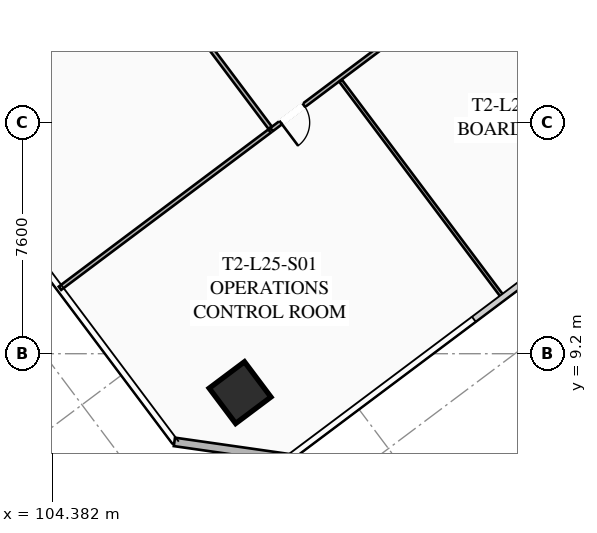
"""IFC4 building model, lengths in metres.
Left out: names, types, materials, properties, quantities, classifications, styles, units other than length and angle.
Written with IfcOpenShell. Run it as: python <this file> out.ifc"""

import sys

from ifc_helpers import new_model, si_unit, direction, frame, frame_2d, origin, origin_2d, place, context, subcontext, project, spatial, rectangle, hollow_rectangle, extrude, element, fill, save


model = new_model("IFC4")
c1 = context("Model", 3, precision=1e-05, world=origin(), true_north=direction((0.0, 1.0)))
c2 = subcontext(c1, "Body", "Model", "MODEL_VIEW")
j1 = project(units=[si_unit("LENGTHUNIT", "METRE"), si_unit("PLANEANGLEUNIT", "RADIAN")], contexts=[c1])
p1 = place(None, origin())
s1 = spatial("IfcSite", under=j1, at=p1, CompositionType="ELEMENT")
p2 = place(p1, origin())
s2 = spatial("IfcBuilding", under=s1, at=p2, CompositionType="ELEMENT")
p3 = place(p2, frame((0.0, 0.0, 95.6)))
s3 = spatial("IfcBuildingStorey", under=s2, at=p3, CompositionType="ELEMENT", Elevation=95.6)
p4 = place(p3, frame((110.56, 7.92, 0.0), z_axis=(0.0, 0.0, 1.0), x_axis=(0.799999996291, 0.600000004945, 0.0)))
e1 = element("IfcColumn", 1, at=p4, inside=s3, PredefinedType="COLUMN", context=c2, shape_type="SweptSolid", body=[
    extrude(hollow_rectangle(XDim=1.45, YDim=1.45, WallThickness=0.055, at=origin_2d()), origin(), (0.0, 0.0, 1.0), 3.35),
])
p5 = place(p3, frame((112.18, 5.76, 0.0), z_axis=(0.0, 0.0, 1.0), x_axis=(-0.989948214866, 0.141430307517, 0.0)))
e2 = element("IfcWall", 2, at=p5, inside=s3, PredefinedType="SOLIDWALL", context=c2, shape_type="SweptSolid", body=[
    extrude(rectangle(XDim=3.818, YDim=0.28, at=frame_2d((1.909, 0.0))), origin(), (0.0, 0.0, 1.0), 3.35),
])
p6 = place(p3, frame((134.18, 33.51, 0.0), z_axis=(0.0, 0.0, 1.0), x_axis=(-0.8, -0.6, 0.0)))
e3 = element("IfcWall", 3, at=p6, inside=s3, PredefinedType="PARTITIONING", context=c2, shape_type="SweptSolid", body=[
    extrude(rectangle(XDim=28.23, YDim=0.135, at=frame_2d((14.115, 0.0))), origin(), (0.0, 0.0, 1.0), 2.703),
])
p7 = place(p6, frame((26.9, 0.0, 0.0)))
e4 = element("IfcOpeningElement", 4, at=p7, cuts=e3, PredefinedType="OPENING", context=c2, shape_type="SweptSolid", body=[
    extrude(rectangle(XDim=0.95, YDim=2.05, at=frame_2d((0.475, 1.025))), frame((0.0, 0.077, 0.0), z_axis=(0.0, -1.0, 0.0), x_axis=(1.0, 0.0, 0.0)), (0.0, 0.0, 1.0), 0.155),
])
p8 = place(p6, frame((20.314, 0.0, 0.0)))
e5 = element("IfcOpeningElement", 5, at=p8, cuts=e3, PredefinedType="OPENING", context=c2, shape_type="SweptSolid", body=[
    extrude(rectangle(XDim=0.95, YDim=2.05, at=frame_2d((0.475, 1.025))), frame((0.0, 0.077, 0.0), z_axis=(0.0, -1.0, 0.0), x_axis=(1.0, 0.0, 0.0)), (0.0, 0.0, 1.0), 0.155),
])
p9 = place(p6, frame((0.38, 0.0, 0.0)))
e6 = element("IfcOpeningElement", 6, at=p9, cuts=e3, PredefinedType="OPENING", context=c2, shape_type="SweptSolid", body=[
    extrude(rectangle(XDim=0.95, YDim=2.05, at=frame_2d((0.475, 1.025))), frame((0.0, 0.077, 0.0), z_axis=(0.0, -1.0, 0.0), x_axis=(1.0, 0.0, 0.0)), (0.0, 0.0, 1.0), 0.155),
])
p10 = place(p3, frame((119.208, 11.056, 0.0), z_axis=(0.0, 0.0, 1.0), x_axis=(-0.6, 0.8, 0.0)))
e7 = element("IfcWall", 7, at=p10, inside=s3, PredefinedType="PARTITIONING", context=c2, shape_type="SweptSolid", body=[
    extrude(rectangle(XDim=8.9, YDim=0.11, at=frame_2d((4.45, 0.0))), origin(), (0.0, 0.0, 1.0), 2.703),
])
p11 = place(p3, frame((111.548, 16.636, 0.0), z_axis=(0.0, 0.0, 1.0), x_axis=(-0.600001772333, 0.799998670747, 0.0)))
e8 = element("IfcWall", 8, at=p11, inside=s3, PredefinedType="PARTITIONING", context=c2, shape_type="SweptSolid", body=[
    extrude(rectangle(XDim=22.04, YDim=0.135, at=frame_2d((11.02, 0.0))), origin(), (0.0, 0.0, 1.0), 2.703),
])
p12 = place(p11, frame((20.79, 0.0, 0.0)))
e9 = element("IfcOpeningElement", 9, at=p12, cuts=e8, PredefinedType="OPENING", context=c2, shape_type="SweptSolid", body=[
    extrude(rectangle(XDim=0.95, YDim=2.05, at=frame_2d((0.475, 1.025))), frame((0.0, 0.077, 0.0), z_axis=(0.0, -1.0, 0.0), x_axis=(1.0, 0.0, 0.0)), (0.0, 0.0, 1.0), 0.155),
])
p13 = place(p3, frame((104.636, 11.352, 0.0), z_axis=(0.0, 0.0, 1.0), x_axis=(0.800006797429, 0.599990936654, 0.0)))
e10 = element("IfcWall", 10, at=p13, inside=s3, PredefinedType="PARTITIONING", context=c2, shape_type="SweptSolid", body=[
    extrude(rectangle(XDim=8.62, YDim=0.135, at=frame_2d((4.31, 0.0))), origin(), (0.0, 0.0, 1.0), 2.703),
])
p14 = place(p7, origin())
e11 = element("IfcDoor", 11, at=p14, inside=s3, OperationType="SINGLE_SWING_RIGHT", PredefinedType="DOOR", context=c2, shape_type="SweptSolid", body=[
    extrude(rectangle(XDim=0.95, YDim=2.05, at=frame_2d((0.475, 1.025))), frame((0.0, 0.025, 0.0), z_axis=(0.0, -1.0, 0.0), x_axis=(1.0, 0.0, 0.0)), (0.0, 0.0, 1.0), 0.05),
])
fill(e4, e11)
save(model, sys.argv[1])
